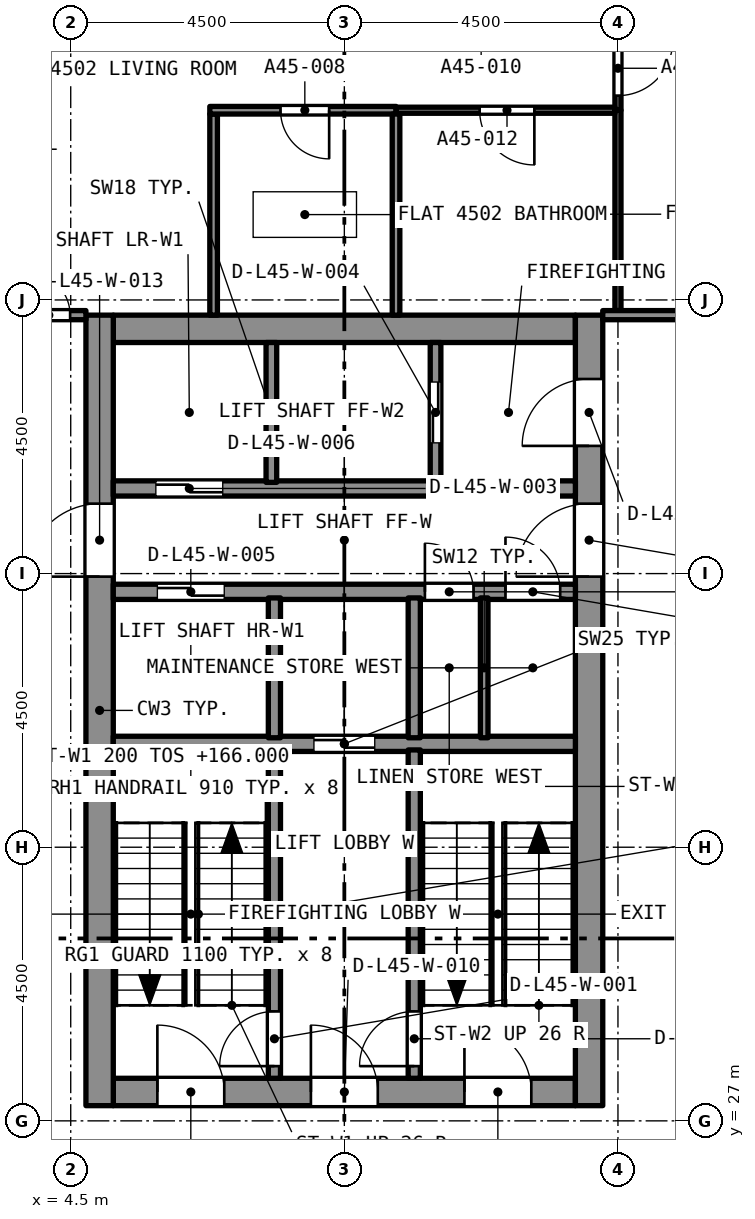
"""IFC4 building model, lengths in metres.
Left out: names, types, materials, properties, quantities, classifications, styles, units other than length and angle.
Written with IfcOpenShell. Run it as: python <this file> out.ifc"""

import sys

from ifc_helpers import new_model, si_unit, direction, frame, frame_2d, origin, place, context, subcontext, project, spatial, rectangle, extrude, element, fill, save


model = new_model("IFC4")
c1 = context("Model", 3, precision=1e-05, world=origin(), true_north=direction((0.0, 1.0)))
c2 = subcontext(c1, "Body", "Model", "MODEL_VIEW")
j1 = project(units=[si_unit("LENGTHUNIT", "METRE"), si_unit("PLANEANGLEUNIT", "RADIAN")], contexts=[c1])
p1 = place(None, origin())
s1 = spatial("IfcSite", under=j1, at=p1, CompositionType="ELEMENT")
p2 = place(p1, origin())
s2 = spatial("IfcBuilding", under=s1, at=p2, CompositionType="ELEMENT")
p3 = place(p2, frame((0.0, 0.0, 163.8)))
s3 = spatial("IfcBuildingStorey", under=s2, at=p3, CompositionType="ELEMENT", Elevation=163.8)
p4 = place(p3, frame((5.2, 27.475, 0.0), z_axis=(0.0, 0.0, 1.0), x_axis=(1.0, 0.0, 0.0)))
e1 = element("IfcWall", 1, at=p4, inside=s3, PredefinedType="SOLIDWALL", context=c2, shape_type="SweptSolid", body=[
    extrude(rectangle(XDim=7.6, YDim=0.45, at=frame_2d((3.8, 0.0))), origin(), (0.0, 0.0, 1.0), 4.4),
])
p5 = place(p4, frame((0.725, 0.0, 0.0)))
e2 = element("IfcOpeningElement", 2, at=p5, cuts=e1, PredefinedType="OPENING", context=c2, shape_type="SweptSolid", body=[
    extrude(rectangle(XDim=1.1, YDim=2.1, at=frame_2d((0.55, 1.05))), frame((0.0, 0.235, 0.0), z_axis=(0.0, -1.0, 0.0), x_axis=(1.0, 0.0, 0.0)), (0.0, 0.0, 1.0), 0.47),
])
p6 = place(p4, frame((3.25, 0.0, 0.0)))
e3 = element("IfcOpeningElement", 3, at=p6, cuts=e1, PredefinedType="OPENING", context=c2, shape_type="SweptSolid", body=[
    extrude(rectangle(XDim=1.1, YDim=2.1, at=frame_2d((0.55, 1.05))), frame((0.0, 0.235, 0.0), z_axis=(0.0, -1.0, 0.0), x_axis=(1.0, 0.0, 0.0)), (0.0, 0.0, 1.0), 0.47),
])
p7 = place(p4, frame((5.775, 0.0, 0.0)))
e4 = element("IfcOpeningElement", 4, at=p7, cuts=e1, PredefinedType="OPENING", context=c2, shape_type="SweptSolid", body=[
    extrude(rectangle(XDim=1.1, YDim=2.1, at=frame_2d((0.55, 1.05))), frame((0.0, 0.235, 0.0), z_axis=(0.0, -1.0, 0.0), x_axis=(1.0, 0.0, 0.0)), (0.0, 0.0, 1.0), 0.47),
])
p8 = place(p3, frame((5.2, 40.025, 0.0), z_axis=(0.0, 0.0, 1.0), x_axis=(1.0, 0.0, 0.0)))
e5 = element("IfcWall", 5, at=p8, inside=s3, PredefinedType="SOLIDWALL", context=c2, shape_type="SweptSolid", body=[
    extrude(rectangle(XDim=7.6, YDim=0.45, at=frame_2d((3.8, 0.0))), origin(), (0.0, 0.0, 1.0), 4.4),
])
p9 = place(p3, frame((4.975, 27.25, 0.0), z_axis=(0.0, 0.0, 1.0), x_axis=(0.0, 1.0, 0.0)))
e6 = element("IfcWall", 6, at=p9, inside=s3, PredefinedType="SOLIDWALL", context=c2, shape_type="SweptSolid", body=[
    extrude(rectangle(XDim=13.0, YDim=0.45, at=frame_2d((6.5, 0.0))), origin(), (0.0, 0.0, 1.0), 4.4),
])
p10 = place(p9, frame((8.7, 0.0, 0.0)))
e7 = element("IfcOpeningElement", 7, at=p10, cuts=e6, PredefinedType="OPENING", context=c2, shape_type="SweptSolid", body=[
    extrude(rectangle(XDim=1.2, YDim=2.1, at=frame_2d((0.6, 1.05))), frame((0.0, 0.235, 0.0), z_axis=(0.0, -1.0, 0.0), x_axis=(1.0, 0.0, 0.0)), (0.0, 0.0, 1.0), 0.47),
])
p11 = place(p3, frame((13.025, 27.25, 0.0), z_axis=(0.0, 0.0, 1.0), x_axis=(0.0, 1.0, 0.0)))
e8 = element("IfcWall", 8, at=p11, inside=s3, PredefinedType="SOLIDWALL", context=c2, shape_type="SweptSolid", body=[
    extrude(rectangle(XDim=13.0, YDim=0.45, at=frame_2d((6.5, 0.0))), origin(), (0.0, 0.0, 1.0), 4.4),
])
p12 = place(p11, frame((10.85, 0.0, 0.0)))
e9 = element("IfcOpeningElement", 9, at=p12, cuts=e8, PredefinedType="OPENING", context=c2, shape_type="SweptSolid", body=[
    extrude(rectangle(XDim=1.1, YDim=2.1, at=frame_2d((0.55, 1.05))), frame((0.0, 0.235, 0.0), z_axis=(0.0, -1.0, 0.0), x_axis=(1.0, 0.0, 0.0)), (0.0, 0.0, 1.0), 0.47),
])
p13 = place(p11, frame((8.7, 0.0, 0.0)))
e10 = element("IfcOpeningElement", 10, at=p13, cuts=e8, PredefinedType="OPENING", context=c2, shape_type="SweptSolid", body=[
    extrude(rectangle(XDim=1.2, YDim=2.1, at=frame_2d((0.6, 1.05))), frame((0.0, 0.235, 0.0), z_axis=(0.0, -1.0, 0.0), x_axis=(1.0, 0.0, 0.0)), (0.0, 0.0, 1.0), 0.47),
])
p14 = place(p3, frame((6.85, 40.25, 0.0), z_axis=(0.0, 0.0, 1.0), x_axis=(0.0, 1.0, 0.0)))
e11 = element("IfcWall", 11, at=p14, inside=s3, PredefinedType="PARTITIONING", context=c2, shape_type="SweptSolid", body=[
    extrude(rectangle(XDim=3.308, YDim=0.125, at=frame_2d((1.654, 0.0))), origin(), (0.0, 0.0, 1.0), 4.1),
])
p15 = place(p3, frame((9.85, 43.62, 0.0), z_axis=(0.0, 0.0, 1.0), x_axis=(-1.0, 0.0, 0.0)))
e12 = element("IfcWall", 12, at=p15, inside=s3, PredefinedType="PARTITIONING", context=c2, shape_type="SweptSolid", body=[
    extrude(rectangle(XDim=3.063, YDim=0.125, at=frame_2d((1.531, 0.0))), origin(), (0.0, 0.0, 1.0), 4.1),
])
p16 = place(p15, frame((1.1, 0.0, 0.0)))
e13 = element("IfcOpeningElement", 13, at=p16, cuts=e12, PredefinedType="OPENING", context=c2, shape_type="SweptSolid", body=[
    extrude(rectangle(XDim=0.8, YDim=2.1, at=frame_2d((0.4, 1.05))), frame((0.0, 0.073, 0.0), z_axis=(0.0, -1.0, 0.0), x_axis=(1.0, 0.0, 0.0)), (0.0, 0.0, 1.0), 0.145),
])
p17 = place(p3, frame((9.85, 40.25, 0.0), z_axis=(0.0, 0.0, 1.0), x_axis=(0.0, 1.0, 0.0)))
e14 = element("IfcWall", 14, at=p17, inside=s3, PredefinedType="PARTITIONING", context=c2, shape_type="SweptSolid", body=[
    extrude(rectangle(XDim=3.308, YDim=0.125, at=frame_2d((1.654, 0.0))), origin(), (0.0, 0.0, 1.0), 4.1),
])
p18 = place(p3, frame((13.5, 45.0, 0.0), z_axis=(0.0, 0.0, 1.0), x_axis=(0.0, -1.0, 0.0)))
e15 = element("IfcWall", 15, at=p18, inside=s3, PredefinedType="PARTITIONING", context=c2, shape_type="SweptSolid", body=[
    extrude(rectangle(XDim=1.38, YDim=0.1, at=frame_2d((0.69, 0.0))), origin(), (0.0, 0.0, 1.0), 4.1),
])
p19 = place(p18, frame((0.24, 0.0, 0.0)))
e16 = element("IfcOpeningElement", 16, at=p19, cuts=e15, PredefinedType="OPENING", context=c2, shape_type="SweptSolid", body=[
    extrude(rectangle(XDim=0.9, YDim=2.1, at=frame_2d((0.45, 1.05))), frame((0.0, 0.06, 0.0), z_axis=(0.0, -1.0, 0.0), x_axis=(1.0, 0.0, 0.0)), (0.0, 0.0, 1.0), 0.12),
])
p20 = place(p3, frame((13.5, 40.325, 0.0), z_axis=(0.0, 0.0, 1.0), x_axis=(0.0, 1.0, 0.0)))
e17 = element("IfcWall", 17, at=p20, inside=s3, PredefinedType="PARTITIONING", context=c2, shape_type="SweptSolid", body=[
    extrude(rectangle(XDim=3.295, YDim=0.1, at=frame_2d((1.647, 0.0))), origin(), (0.0, 0.0, 1.0), 4.1),
])
p21 = place(p3, frame((13.45, 43.62, 0.0), z_axis=(0.0, 0.0, 1.0), x_axis=(-1.0, 0.0, 0.0)))
e18 = element("IfcWall", 18, at=p21, inside=s3, PredefinedType="PARTITIONING", context=c2, shape_type="SweptSolid", body=[
    extrude(rectangle(XDim=3.6, YDim=0.1, at=frame_2d((1.8, 0.0))), origin(), (0.0, 0.0, 1.0), 4.1),
])
p22 = place(p21, frame((1.325, 0.0, 0.0)))
e19 = element("IfcOpeningElement", 19, at=p22, cuts=e18, PredefinedType="OPENING", context=c2, shape_type="SweptSolid", body=[
    extrude(rectangle(XDim=0.9, YDim=2.1, at=frame_2d((0.45, 1.05))), frame((0.0, 0.06, 0.0), z_axis=(0.0, -1.0, 0.0), x_axis=(1.0, 0.0, 0.0)), (0.0, 0.0, 1.0), 0.12),
])
p23 = place(p3, frame((3.55, 40.25, 0.0), z_axis=(0.0, 0.0, 1.0), x_axis=(1.0, 0.0, 0.0)))
e20 = element("IfcWall", 20, at=p23, inside=s3, PredefinedType="PARTITIONING", context=c2, shape_type="SweptSolid", body=[
    extrude(rectangle(XDim=1.2, YDim=0.15, at=frame_2d((0.6, 0.0))), origin(), (0.0, 0.0, 1.0), 4.1),
])
p24 = place(p23, frame((0.24, 0.0, 0.0)))
e21 = element("IfcOpeningElement", 21, at=p24, cuts=e20, PredefinedType="OPENING", context=c2, shape_type="SweptSolid", body=[
    extrude(rectangle(XDim=0.7, YDim=2.1, at=frame_2d((0.35, 1.05))), frame((0.0, 0.085, 0.0), z_axis=(0.0, -1.0, 0.0), x_axis=(1.0, 0.0, 0.0)), (0.0, 0.0, 1.0), 0.17),
])
p25 = place(p3, frame((13.25, 40.25, 0.0), z_axis=(0.0, 0.0, 1.0), x_axis=(1.0, 0.0, 0.0)))
e22 = element("IfcWall", 22, at=p25, inside=s3, PredefinedType="PARTITIONING", context=c2, shape_type="SweptSolid", body=[
    extrude(rectangle(XDim=1.675, YDim=0.15, at=frame_2d((0.837, 0.0))), origin(), (0.0, 0.0, 1.0), 4.1),
])
p26 = place(p3, frame((5.2, 33.2, 0.0), z_axis=(0.0, 0.0, 1.0), x_axis=(1.0, 0.0, 0.0)))
e23 = element("IfcWall", 23, at=p26, inside=s3, PredefinedType="SOLIDWALL", context=c2, shape_type="SweptSolid", body=[
    extrude(rectangle(XDim=7.6, YDim=0.25, at=frame_2d((3.8, 0.0))), origin(), (0.0, 0.0, 1.0), 4.1),
])
p27 = place(p26, frame((3.3, 0.0, 0.0)))
e24 = element("IfcOpeningElement", 24, at=p27, cuts=e23, PredefinedType="OPENING", context=c2, shape_type="SweptSolid", body=[
    extrude(rectangle(XDim=1.0, YDim=2.1, at=frame_2d((0.5, 1.05))), frame((0.0, 0.135, 0.0), z_axis=(0.0, -1.0, 0.0), x_axis=(1.0, 0.0, 0.0)), (0.0, 0.0, 1.0), 0.27),
])
p28 = place(p3, frame((5.2, 35.7, 0.0), z_axis=(0.0, 0.0, 1.0), x_axis=(1.0, 0.0, 0.0)))
e25 = element("IfcWall", 25, at=p28, inside=s3, PredefinedType="SOLIDWALL", context=c2, shape_type="SweptSolid", body=[
    extrude(rectangle(XDim=7.6, YDim=0.25, at=frame_2d((3.8, 0.0))), origin(), (0.0, 0.0, 1.0), 4.1),
])
p29 = place(p28, frame((0.725, 0.0, 0.0)))
e26 = element("IfcOpeningElement", 26, at=p29, cuts=e25, PredefinedType="OPENING", context=c2, shape_type="SweptSolid", body=[
    extrude(rectangle(XDim=1.1, YDim=2.4, at=frame_2d((0.55, 1.2))), frame((0.0, 0.135, 0.0), z_axis=(0.0, -1.0, 0.0), x_axis=(1.0, 0.0, 0.0)), (0.0, 0.0, 1.0), 0.27),
])
p30 = place(p28, frame((5.125, 0.0, 0.0)))
e27 = element("IfcOpeningElement", 27, at=p30, cuts=e25, PredefinedType="OPENING", context=c2, shape_type="SweptSolid", body=[
    extrude(rectangle(XDim=0.8, YDim=2.1, at=frame_2d((0.4, 1.05))), frame((0.0, 0.135, 0.0), z_axis=(0.0, -1.0, 0.0), x_axis=(1.0, 0.0, 0.0)), (0.0, 0.0, 1.0), 0.27),
])
p31 = place(p28, frame((6.45, 0.0, 0.0)))
e28 = element("IfcOpeningElement", 28, at=p31, cuts=e25, PredefinedType="OPENING", context=c2, shape_type="SweptSolid", body=[
    extrude(rectangle(XDim=0.9, YDim=2.1, at=frame_2d((0.45, 1.05))), frame((0.0, 0.135, 0.0), z_axis=(0.0, -1.0, 0.0), x_axis=(1.0, 0.0, 0.0)), (0.0, 0.0, 1.0), 0.27),
])
p32 = place(p3, frame((5.2, 37.4, 0.0), z_axis=(0.0, 0.0, 1.0), x_axis=(1.0, 0.0, 0.0)))
e29 = element("IfcWall", 29, at=p32, inside=s3, PredefinedType="SOLIDWALL", context=c2, shape_type="SweptSolid", body=[
    extrude(rectangle(XDim=7.6, YDim=0.25, at=frame_2d((3.8, 0.0))), origin(), (0.0, 0.0, 1.0), 4.1),
])
p33 = place(p32, frame((0.7, 0.0, 0.0)))
e30 = element("IfcOpeningElement", 30, at=p33, cuts=e29, PredefinedType="OPENING", context=c2, shape_type="SweptSolid", body=[
    extrude(rectangle(XDim=1.1, YDim=2.4, at=frame_2d((0.55, 1.2))), frame((0.0, 0.135, 0.0), z_axis=(0.0, -1.0, 0.0), x_axis=(1.0, 0.0, 0.0)), (0.0, 0.0, 1.0), 0.27),
])
p34 = place(p3, frame((7.85, 27.7, 0.0), z_axis=(0.0, 0.0, 1.0), x_axis=(0.0, 1.0, 0.0)))
e31 = element("IfcWall", 31, at=p34, inside=s3, PredefinedType="SOLIDWALL", context=c2, shape_type="SweptSolid", body=[
    extrude(rectangle(XDim=5.4, YDim=0.2, at=frame_2d((2.7, 0.0))), origin(), (0.0, 0.0, 1.0), 4.1),
])
p35 = place(p34, frame((0.2, 0.0, 0.0)))
e32 = element("IfcOpeningElement", 32, at=p35, cuts=e31, PredefinedType="OPENING", context=c2, shape_type="SweptSolid", body=[
    extrude(rectangle(XDim=0.9, YDim=2.1, at=frame_2d((0.45, 1.05))), frame((0.0, 0.11, 0.0), z_axis=(0.0, -1.0, 0.0), x_axis=(1.0, 0.0, 0.0)), (0.0, 0.0, 1.0), 0.22),
])
p36 = place(p3, frame((10.15, 27.7, 0.0), z_axis=(0.0, 0.0, 1.0), x_axis=(0.0, 1.0, 0.0)))
e33 = element("IfcWall", 33, at=p36, inside=s3, PredefinedType="SOLIDWALL", context=c2, shape_type="SweptSolid", body=[
    extrude(rectangle(XDim=5.4, YDim=0.2, at=frame_2d((2.7, 0.0))), origin(), (0.0, 0.0, 1.0), 4.1),
])
p37 = place(p36, frame((0.2, 0.0, 0.0)))
e34 = element("IfcOpeningElement", 34, at=p37, cuts=e33, PredefinedType="OPENING", context=c2, shape_type="SweptSolid", body=[
    extrude(rectangle(XDim=0.9, YDim=2.1, at=frame_2d((0.45, 1.05))), frame((0.0, 0.11, 0.0), z_axis=(0.0, -1.0, 0.0), x_axis=(1.0, 0.0, 0.0)), (0.0, 0.0, 1.0), 0.22),
])
for number, where, z_axis, x_axis in (
    (35, (7.85, 33.3, 0.0), (0.0, 0.0, 1.0), (0.0, 1.0, 0.0)),
    (36, (10.15, 33.3, 0.0), (0.0, 0.0, 1.0), (0.0, 1.0, 0.0)),
):
    element("IfcWall", number, at=place(p3, frame(where, z_axis=z_axis, x_axis=x_axis)), inside=s3, PredefinedType="SOLIDWALL", context=c2, shape_type="SweptSolid", body=[
        extrude(rectangle(XDim=2.3, YDim=0.2, at=frame_2d((1.15, 0.0))), origin(), (0.0, 0.0, 1.0), 4.1),
    ])
p38 = place(p3, frame((7.8, 37.5, 0.0), z_axis=(0.0, 0.0, 1.0), x_axis=(0.0, 1.0, 0.0)))
e37 = element("IfcWall", 37, at=p38, inside=s3, PredefinedType="SOLIDWALL", context=c2, shape_type="SweptSolid", body=[
    extrude(rectangle(XDim=2.3, YDim=0.175, at=frame_2d((1.15, 0.0))), origin(), (0.0, 0.0, 1.0), 4.1),
])
p39 = place(p3, frame((10.5, 37.5, 0.0), z_axis=(0.0, 0.0, 1.0), x_axis=(0.0, 1.0, 0.0)))
e38 = element("IfcWall", 38, at=p39, inside=s3, PredefinedType="SOLIDWALL", context=c2, shape_type="SweptSolid", body=[
    extrude(rectangle(XDim=2.3, YDim=0.175, at=frame_2d((1.15, 0.0))), origin(), (0.0, 0.0, 1.0), 4.1),
])
p40 = place(p39, frame((0.65, 0.0, 0.0)))
e39 = element("IfcOpeningElement", 39, at=p40, cuts=e38, PredefinedType="OPENING", context=c2, shape_type="SweptSolid", body=[
    extrude(rectangle(XDim=1.0, YDim=2.1, at=frame_2d((0.5, 1.05))), frame((0.0, 0.097, 0.0), z_axis=(0.0, -1.0, 0.0), x_axis=(1.0, 0.0, 0.0)), (0.0, 0.0, 1.0), 0.195),
])
p41 = place(p3, frame((11.3, 33.3, 0.0), z_axis=(0.0, 0.0, 1.0), x_axis=(0.0, 1.0, 0.0)))
e40 = element("IfcWall", 40, at=p41, inside=s3, PredefinedType="PARTITIONING", context=c2, shape_type="SweptSolid", body=[
    extrude(rectangle(XDim=2.3, YDim=0.125, at=frame_2d((1.15, 0.0))), origin(), (0.0, 0.0, 1.0), 4.1),
])
p42 = place(p16, origin())
e41 = element("IfcDoor", 41, at=p42, inside=s3, OperationType="SINGLE_SWING_LEFT", PredefinedType="DOOR", context=c2, shape_type="SweptSolid", body=[
    extrude(rectangle(XDim=0.8, YDim=2.1, at=frame_2d((0.4, 1.05))), frame((0.0, 0.025, 0.0), z_axis=(0.0, -1.0, 0.0), x_axis=(1.0, 0.0, 0.0)), (0.0, 0.0, 1.0), 0.05),
])
fill(e13, e41)
p43 = place(p19, origin())
e42 = element("IfcDoor", 42, at=p43, inside=s3, OperationType="SINGLE_SWING_LEFT", PredefinedType="DOOR", context=c2, shape_type="SweptSolid", body=[
    extrude(rectangle(XDim=0.9, YDim=2.1, at=frame_2d((0.45, 1.05))), frame((0.0, 0.025, 0.0), z_axis=(0.0, -1.0, 0.0), x_axis=(1.0, 0.0, 0.0)), (0.0, 0.0, 1.0), 0.05),
])
fill(e16, e42)
p44 = place(p22, origin())
e43 = element("IfcDoor", 43, at=p44, inside=s3, OperationType="SINGLE_SWING_LEFT", PredefinedType="DOOR", context=c2, shape_type="SweptSolid", body=[
    extrude(rectangle(XDim=0.9, YDim=2.1, at=frame_2d((0.45, 1.05))), frame((0.0, 0.025, 0.0), z_axis=(0.0, -1.0, 0.0), x_axis=(1.0, 0.0, 0.0)), (0.0, 0.0, 1.0), 0.05),
])
fill(e19, e43)
p45 = place(p24, origin())
e44 = element("IfcDoor", 44, at=p45, inside=s3, OperationType="SINGLE_SWING_LEFT", PredefinedType="DOOR", context=c2, shape_type="SweptSolid", body=[
    extrude(rectangle(XDim=0.7, YDim=2.1, at=frame_2d((0.35, 1.05))), frame((0.0, 0.025, 0.0), z_axis=(0.0, -1.0, 0.0), x_axis=(1.0, 0.0, 0.0)), (0.0, 0.0, 1.0), 0.05),
])
fill(e21, e44)
p46 = place(p35, origin())
e45 = element("IfcDoor", 45, at=p46, inside=s3, OperationType="SINGLE_SWING_LEFT", PredefinedType="DOOR", context=c2, shape_type="SweptSolid", body=[
    extrude(rectangle(XDim=0.9, YDim=2.1, at=frame_2d((0.45, 1.05))), frame((0.0, 0.025, 0.0), z_axis=(0.0, -1.0, 0.0), x_axis=(1.0, 0.0, 0.0)), (0.0, 0.0, 1.0), 0.05),
])
fill(e32, e45)
p47 = place(p37, origin())
e46 = element("IfcDoor", 46, at=p47, inside=s3, OperationType="SINGLE_SWING_LEFT", PredefinedType="DOOR", context=c2, shape_type="SweptSolid", body=[
    extrude(rectangle(XDim=0.9, YDim=2.1, at=frame_2d((0.45, 1.05))), frame((0.0, 0.025, 0.0), z_axis=(0.0, -1.0, 0.0), x_axis=(1.0, 0.0, 0.0)), (0.0, 0.0, 1.0), 0.05),
])
fill(e34, e46)
p48 = place(p33, origin())
e47 = element("IfcDoor", 47, at=p48, inside=s3, OperationType="SLIDING_TO_LEFT", PredefinedType="DOOR", context=c2, shape_type="SweptSolid", body=[
    extrude(rectangle(XDim=1.1, YDim=2.4, at=frame_2d((0.55, 1.2))), frame((0.0, 0.025, 0.0), z_axis=(0.0, -1.0, 0.0), x_axis=(1.0, 0.0, 0.0)), (0.0, 0.0, 1.0), 0.05),
])
fill(e30, e47)
p49 = place(p40, origin())
e48 = element("IfcDoor", 48, at=p49, inside=s3, OperationType="SLIDING_TO_LEFT", PredefinedType="DOOR", context=c2, shape_type="SweptSolid", body=[
    extrude(rectangle(XDim=1.0, YDim=2.1, at=frame_2d((0.5, 1.05))), frame((0.0, 0.025, 0.0), z_axis=(0.0, -1.0, 0.0), x_axis=(1.0, 0.0, 0.0)), (0.0, 0.0, 1.0), 0.05),
])
fill(e39, e48)
p50 = place(p29, origin())
e49 = element("IfcDoor", 49, at=p50, inside=s3, OperationType="SLIDING_TO_LEFT", PredefinedType="DOOR", context=c2, shape_type="SweptSolid", body=[
    extrude(rectangle(XDim=1.1, YDim=2.4, at=frame_2d((0.55, 1.2))), frame((0.0, 0.025, 0.0), z_axis=(0.0, -1.0, 0.0), x_axis=(1.0, 0.0, 0.0)), (0.0, 0.0, 1.0), 0.05),
])
fill(e26, e49)
p51 = place(p27, origin())
e50 = element("IfcDoor", 50, at=p51, inside=s3, OperationType="SLIDING_TO_LEFT", PredefinedType="DOOR", context=c2, shape_type="SweptSolid", body=[
    extrude(rectangle(XDim=1.0, YDim=2.1, at=frame_2d((0.5, 1.05))), frame((0.0, 0.025, 0.0), z_axis=(0.0, -1.0, 0.0), x_axis=(1.0, 0.0, 0.0)), (0.0, 0.0, 1.0), 0.05),
])
fill(e24, e50)
p52 = place(p30, origin())
e51 = element("IfcDoor", 51, at=p52, inside=s3, OperationType="SINGLE_SWING_LEFT", PredefinedType="DOOR", context=c2, shape_type="SweptSolid", body=[
    extrude(rectangle(XDim=0.8, YDim=2.1, at=frame_2d((0.4, 1.05))), frame((0.0, 0.025, 0.0), z_axis=(0.0, -1.0, 0.0), x_axis=(1.0, 0.0, 0.0)), (0.0, 0.0, 1.0), 0.05),
])
fill(e27, e51)
p53 = place(p31, origin())
e52 = element("IfcDoor", 52, at=p53, inside=s3, OperationType="SINGLE_SWING_LEFT", PredefinedType="DOOR", context=c2, shape_type="SweptSolid", body=[
    extrude(rectangle(XDim=0.9, YDim=2.1, at=frame_2d((0.45, 1.05))), frame((0.0, 0.025, 0.0), z_axis=(0.0, -1.0, 0.0), x_axis=(1.0, 0.0, 0.0)), (0.0, 0.0, 1.0), 0.05),
])
fill(e28, e52)
p54 = place(p5, origin())
e53 = element("IfcDoor", 53, at=p54, inside=s3, OperationType="SINGLE_SWING_LEFT", PredefinedType="DOOR", context=c2, shape_type="SweptSolid", body=[
    extrude(rectangle(XDim=1.1, YDim=2.1, at=frame_2d((0.55, 1.05))), frame((0.0, 0.025, 0.0), z_axis=(0.0, -1.0, 0.0), x_axis=(1.0, 0.0, 0.0)), (0.0, 0.0, 1.0), 0.05),
])
fill(e2, e53)
p55 = place(p6, origin())
e54 = element("IfcDoor", 54, at=p55, inside=s3, OperationType="SINGLE_SWING_LEFT", PredefinedType="DOOR", context=c2, shape_type="SweptSolid", body=[
    extrude(rectangle(XDim=1.1, YDim=2.1, at=frame_2d((0.55, 1.05))), frame((0.0, 0.025, 0.0), z_axis=(0.0, -1.0, 0.0), x_axis=(1.0, 0.0, 0.0)), (0.0, 0.0, 1.0), 0.05),
])
fill(e3, e54)
p56 = place(p7, origin())
e55 = element("IfcDoor", 55, at=p56, inside=s3, OperationType="SINGLE_SWING_LEFT", PredefinedType="DOOR", context=c2, shape_type="SweptSolid", body=[
    extrude(rectangle(XDim=1.1, YDim=2.1, at=frame_2d((0.55, 1.05))), frame((0.0, 0.025, 0.0), z_axis=(0.0, -1.0, 0.0), x_axis=(1.0, 0.0, 0.0)), (0.0, 0.0, 1.0), 0.05),
])
fill(e4, e55)
p57 = place(p12, origin())
e56 = element("IfcDoor", 56, at=p57, inside=s3, OperationType="SINGLE_SWING_LEFT", PredefinedType="DOOR", context=c2, shape_type="SweptSolid", body=[
    extrude(rectangle(XDim=1.1, YDim=2.1, at=frame_2d((0.55, 1.05))), frame((0.0, 0.025, 0.0), z_axis=(0.0, -1.0, 0.0), x_axis=(1.0, 0.0, 0.0)), (0.0, 0.0, 1.0), 0.05),
])
fill(e9, e56)
p58 = place(p10, origin())
e57 = element("IfcDoor", 57, at=p58, inside=s3, OperationType="SINGLE_SWING_LEFT", PredefinedType="DOOR", context=c2, shape_type="SweptSolid", body=[
    extrude(rectangle(XDim=1.2, YDim=2.1, at=frame_2d((0.6, 1.05))), frame((0.0, 0.025, 0.0), z_axis=(0.0, -1.0, 0.0), x_axis=(1.0, 0.0, 0.0)), (0.0, 0.0, 1.0), 0.05),
])
fill(e7, e57)
p59 = place(p13, origin())
e58 = element("IfcDoor", 58, at=p59, inside=s3, OperationType="SINGLE_SWING_LEFT", PredefinedType="DOOR", context=c2, shape_type="SweptSolid", body=[
    extrude(rectangle(XDim=1.2, YDim=2.1, at=frame_2d((0.6, 1.05))), frame((0.0, 0.025, 0.0), z_axis=(0.0, -1.0, 0.0), x_axis=(1.0, 0.0, 0.0)), (0.0, 0.0, 1.0), 0.05),
])
fill(e10, e58)
save(model, sys.argv[1])
